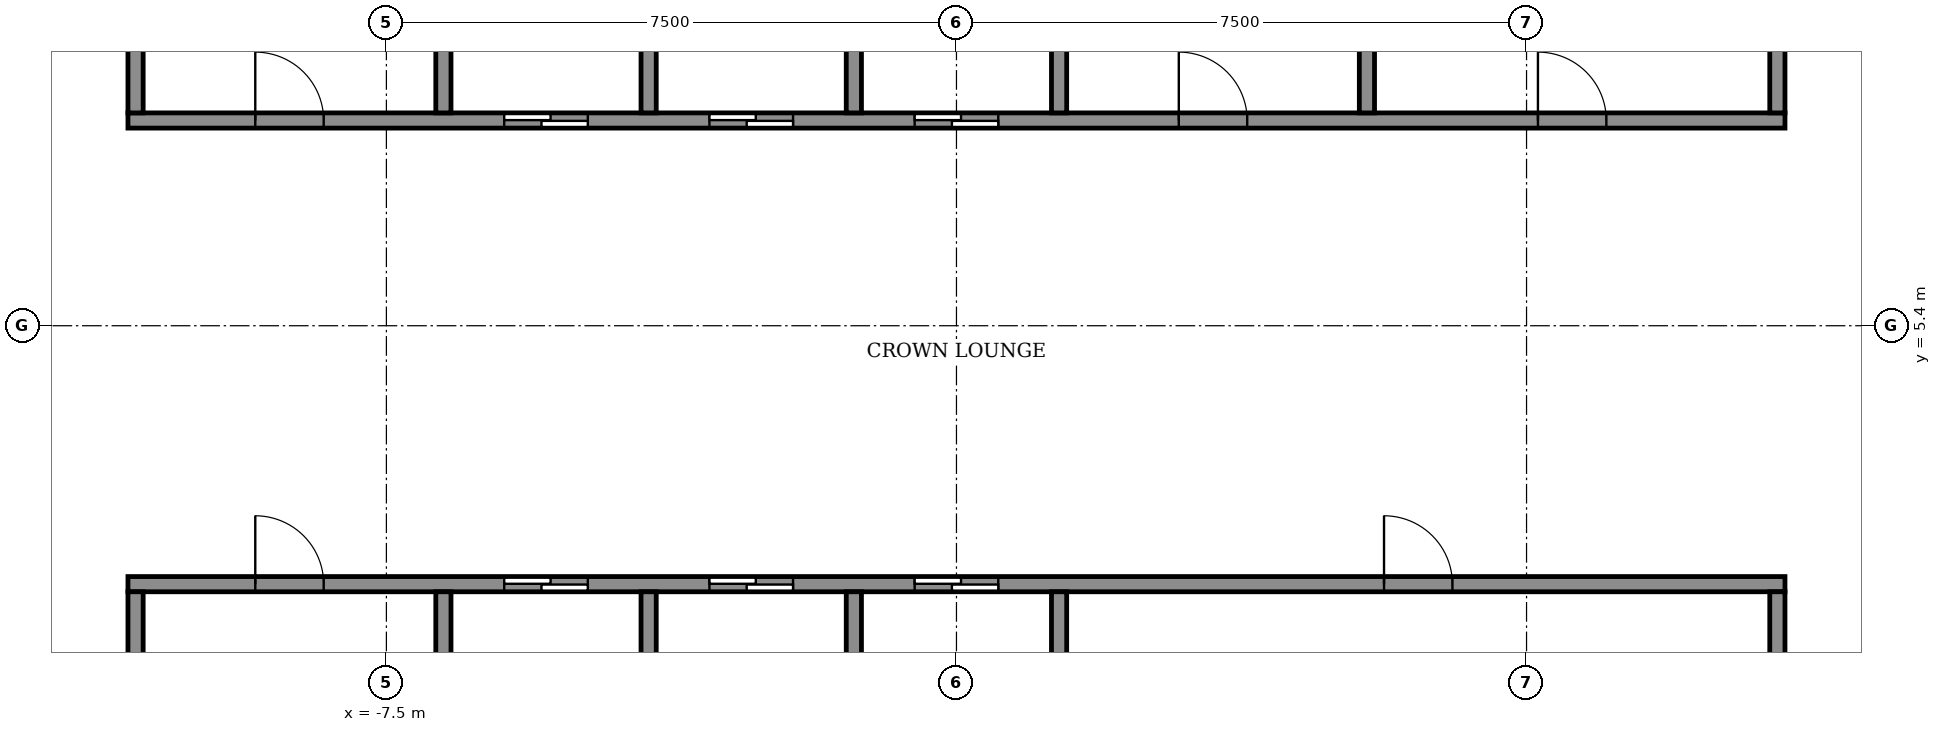
"""IFC4 building model, lengths in metres.
Left out: names, types, materials, properties, quantities, classifications, styles, units other than length and angle.
Written with IfcOpenShell. Run it as: python <this file> out.ifc"""

import sys

from ifc_helpers import new_model, si_unit, direction, frame, frame_2d, origin, place, context, subcontext, project, spatial, rectangle, extrude, element, fill, save


model = new_model("IFC4")
c1 = context("Model", 3, precision=1e-05, world=origin(), true_north=direction((0.0, 1.0)))
c2 = subcontext(c1, "Body", "Model", "MODEL_VIEW")
j1 = project(units=[si_unit("LENGTHUNIT", "METRE"), si_unit("PLANEANGLEUNIT", "RADIAN")], contexts=[c1])
p1 = place(None, origin())
s1 = spatial("IfcSite", under=j1, at=p1, CompositionType="ELEMENT")
p2 = place(p1, origin())
s2 = spatial("IfcBuilding", under=s1, at=p2, CompositionType="ELEMENT")
p3 = place(p2, frame((0.0, 0.0, 342.5)))
s3 = spatial("IfcBuildingStorey", under=s2, at=p3, CompositionType="ELEMENT", Elevation=342.5)
p4 = place(p3, frame((-10.9, 2.0, 0.0), z_axis=(0.0, 0.0, 1.0), x_axis=(1.0, 0.0, 0.0)))
e1 = element("IfcWall", 1, at=p4, inside=s3, PredefinedType="SHEAR", context=c2, shape_type="SweptSolid", body=[
    extrude(rectangle(XDim=21.8, YDim=0.2, at=frame_2d((10.9, 0.0))), origin(), (0.0, 0.0, 1.0), 3.05),
])
p5 = place(p4, frame((4.95, 0.0, 0.0)))
e2 = element("IfcOpeningElement", 2, at=p5, cuts=e1, PredefinedType="OPENING", context=c2, shape_type="SweptSolid", body=[
    extrude(rectangle(XDim=1.1, YDim=2.1, at=frame_2d((0.55, 1.05))), frame((0.0, 0.11, 0.0), z_axis=(0.0, -1.0, 0.0), x_axis=(1.0, 0.0, 0.0)), (0.0, 0.0, 1.0), 0.22),
])
p6 = place(p4, frame((7.65, 0.0, 0.0)))
e3 = element("IfcOpeningElement", 3, at=p6, cuts=e1, PredefinedType="OPENING", context=c2, shape_type="SweptSolid", body=[
    extrude(rectangle(XDim=1.1, YDim=2.1, at=frame_2d((0.55, 1.05))), frame((0.0, 0.11, 0.0), z_axis=(0.0, -1.0, 0.0), x_axis=(1.0, 0.0, 0.0)), (0.0, 0.0, 1.0), 0.22),
])
p7 = place(p4, frame((10.35, 0.0, 0.0)))
e4 = element("IfcOpeningElement", 4, at=p7, cuts=e1, PredefinedType="OPENING", context=c2, shape_type="SweptSolid", body=[
    extrude(rectangle(XDim=1.1, YDim=2.1, at=frame_2d((0.55, 1.05))), frame((0.0, 0.11, 0.0), z_axis=(0.0, -1.0, 0.0), x_axis=(1.0, 0.0, 0.0)), (0.0, 0.0, 1.0), 0.22),
])
p8 = place(p4, frame((1.675, 0.0, 0.0)))
e5 = element("IfcOpeningElement", 5, at=p8, cuts=e1, PredefinedType="OPENING", context=c2, shape_type="SweptSolid", body=[
    extrude(rectangle(XDim=0.9, YDim=2.1, at=frame_2d((0.45, 1.05))), frame((0.0, 0.11, 0.0), z_axis=(0.0, -1.0, 0.0), x_axis=(1.0, 0.0, 0.0)), (0.0, 0.0, 1.0), 0.22),
])
p9 = place(p4, frame((16.525, 0.0, 0.0)))
e6 = element("IfcOpeningElement", 6, at=p9, cuts=e1, PredefinedType="OPENING", context=c2, shape_type="SweptSolid", body=[
    extrude(rectangle(XDim=0.9, YDim=2.1, at=frame_2d((0.45, 1.05))), frame((0.0, 0.11, 0.0), z_axis=(0.0, -1.0, 0.0), x_axis=(1.0, 0.0, 0.0)), (0.0, 0.0, 1.0), 0.22),
])
p10 = place(p3, frame((-10.9, 8.1, 0.0), z_axis=(0.0, 0.0, 1.0), x_axis=(1.0, 0.0, 0.0)))
e7 = element("IfcWall", 7, at=p10, inside=s3, PredefinedType="SHEAR", context=c2, shape_type="SweptSolid", body=[
    extrude(rectangle(XDim=21.8, YDim=0.2, at=frame_2d((10.9, 0.0))), origin(), (0.0, 0.0, 1.0), 3.05),
])
p11 = place(p10, frame((4.95, 0.0, 0.0)))
e8 = element("IfcOpeningElement", 8, at=p11, cuts=e7, PredefinedType="OPENING", context=c2, shape_type="SweptSolid", body=[
    extrude(rectangle(XDim=1.1, YDim=2.1, at=frame_2d((0.55, 1.05))), frame((0.0, 0.11, 0.0), z_axis=(0.0, -1.0, 0.0), x_axis=(1.0, 0.0, 0.0)), (0.0, 0.0, 1.0), 0.22),
])
p12 = place(p10, frame((7.65, 0.0, 0.0)))
e9 = element("IfcOpeningElement", 9, at=p12, cuts=e7, PredefinedType="OPENING", context=c2, shape_type="SweptSolid", body=[
    extrude(rectangle(XDim=1.1, YDim=2.1, at=frame_2d((0.55, 1.05))), frame((0.0, 0.11, 0.0), z_axis=(0.0, -1.0, 0.0), x_axis=(1.0, 0.0, 0.0)), (0.0, 0.0, 1.0), 0.22),
])
p13 = place(p10, frame((10.35, 0.0, 0.0)))
e10 = element("IfcOpeningElement", 10, at=p13, cuts=e7, PredefinedType="OPENING", context=c2, shape_type="SweptSolid", body=[
    extrude(rectangle(XDim=1.1, YDim=2.1, at=frame_2d((0.55, 1.05))), frame((0.0, 0.11, 0.0), z_axis=(0.0, -1.0, 0.0), x_axis=(1.0, 0.0, 0.0)), (0.0, 0.0, 1.0), 0.22),
])
p14 = place(p10, frame((1.675, 0.0, 0.0)))
e11 = element("IfcOpeningElement", 11, at=p14, cuts=e7, PredefinedType="OPENING", context=c2, shape_type="SweptSolid", body=[
    extrude(rectangle(XDim=0.9, YDim=2.1, at=frame_2d((0.45, 1.05))), frame((0.0, 0.11, 0.0), z_axis=(0.0, -1.0, 0.0), x_axis=(1.0, 0.0, 0.0)), (0.0, 0.0, 1.0), 0.22),
])
p15 = place(p10, frame((13.825, 0.0, 0.0)))
e12 = element("IfcOpeningElement", 12, at=p15, cuts=e7, PredefinedType="OPENING", context=c2, shape_type="SweptSolid", body=[
    extrude(rectangle(XDim=0.9, YDim=2.1, at=frame_2d((0.45, 1.05))), frame((0.0, 0.11, 0.0), z_axis=(0.0, -1.0, 0.0), x_axis=(1.0, 0.0, 0.0)), (0.0, 0.0, 1.0), 0.22),
])
p16 = place(p10, frame((18.55, 0.0, 0.0)))
e13 = element("IfcOpeningElement", 13, at=p16, cuts=e7, PredefinedType="OPENING", context=c2, shape_type="SweptSolid", body=[
    extrude(rectangle(XDim=0.9, YDim=2.1, at=frame_2d((0.45, 1.05))), frame((0.0, 0.11, 0.0), z_axis=(0.0, -1.0, 0.0), x_axis=(1.0, 0.0, 0.0)), (0.0, 0.0, 1.0), 0.22),
])
p17 = place(p3, frame((-10.8, -0.6, 0.0), z_axis=(0.0, 0.0, 1.0), x_axis=(0.0, 1.0, 0.0)))
e14 = element("IfcWall", 14, at=p17, inside=s3, PredefinedType="STANDARD", context=c2, shape_type="SweptSolid", body=[
    extrude(rectangle(XDim=2.5, YDim=0.2, at=frame_2d((1.25, 0.0))), origin(), (0.0, 0.0, 1.0), 3.05),
])
for number, where, z_axis, x_axis in (
    (15, (-6.75, -0.6, 0.0), (0.0, 0.0, 1.0), (0.0, 1.0, 0.0)),
    (16, (-4.05, -0.6, 0.0), (0.0, 0.0, 1.0), (0.0, 1.0, 0.0)),
    (17, (-1.35, -0.6, 0.0), (0.0, 0.0, 1.0), (0.0, 1.0, 0.0)),
    (18, (1.35, -0.6, 0.0), (0.0, 0.0, 1.0), (0.0, 1.0, 0.0)),
):
    element("IfcWall", number, at=place(p3, frame(where, z_axis=z_axis, x_axis=x_axis)), inside=s3, PredefinedType="SHEAR", context=c2, shape_type="SweptSolid", body=[
        extrude(rectangle(XDim=2.5, YDim=0.2, at=frame_2d((1.25, 0.0))), origin(), (0.0, 0.0, 1.0), 3.05),
    ])
p18 = place(p3, frame((10.8, -0.6, 0.0), z_axis=(0.0, 0.0, 1.0), x_axis=(0.0, 1.0, 0.0)))
e19 = element("IfcWall", 19, at=p18, inside=s3, PredefinedType="STANDARD", context=c2, shape_type="SweptSolid", body=[
    extrude(rectangle(XDim=2.5, YDim=0.2, at=frame_2d((1.25, 0.0))), origin(), (0.0, 0.0, 1.0), 3.05),
])
p19 = place(p3, frame((-10.8, 8.2, 0.0), z_axis=(0.0, 0.0, 1.0), x_axis=(0.0, 1.0, 0.0)))
e20 = element("IfcWall", 20, at=p19, inside=s3, PredefinedType="STANDARD", context=c2, shape_type="SweptSolid", body=[
    extrude(rectangle(XDim=2.6, YDim=0.2, at=frame_2d((1.3, 0.0))), origin(), (0.0, 0.0, 1.0), 3.05),
])
for number, where, z_axis, x_axis in (
    (21, (-6.75, 8.2, 0.0), (0.0, 0.0, 1.0), (0.0, 1.0, 0.0)),
    (22, (-4.05, 8.2, 0.0), (0.0, 0.0, 1.0), (0.0, 1.0, 0.0)),
    (23, (-1.35, 8.2, 0.0), (0.0, 0.0, 1.0), (0.0, 1.0, 0.0)),
    (24, (1.35, 8.2, 0.0), (0.0, 0.0, 1.0), (0.0, 1.0, 0.0)),
):
    element("IfcWall", number, at=place(p3, frame(where, z_axis=z_axis, x_axis=x_axis)), inside=s3, PredefinedType="SHEAR", context=c2, shape_type="SweptSolid", body=[
        extrude(rectangle(XDim=2.6, YDim=0.2, at=frame_2d((1.3, 0.0))), origin(), (0.0, 0.0, 1.0), 3.05),
    ])
for number, where, z_axis, x_axis in (
    (25, (5.4, 8.2, 0.0), (0.0, 0.0, 1.0), (0.0, 1.0, 0.0)),
    (26, (10.8, 8.2, 0.0), (0.0, 0.0, 1.0), (0.0, 1.0, 0.0)),
):
    element("IfcWall", number, at=place(p3, frame(where, z_axis=z_axis, x_axis=x_axis)), inside=s3, PredefinedType="STANDARD", context=c2, shape_type="SweptSolid", body=[
        extrude(rectangle(XDim=2.6, YDim=0.2, at=frame_2d((1.3, 0.0))), origin(), (0.0, 0.0, 1.0), 3.05),
    ])
p20 = place(p5, origin())
e27 = element("IfcDoor", 27, at=p20, inside=s3, OperationType="SLIDING_TO_LEFT", PredefinedType="DOOR", context=c2, shape_type="SweptSolid", body=[
    extrude(rectangle(XDim=1.1, YDim=2.1, at=frame_2d((0.55, 1.05))), frame((0.0, 0.025, 0.0), z_axis=(0.0, -1.0, 0.0), x_axis=(1.0, 0.0, 0.0)), (0.0, 0.0, 1.0), 0.05),
])
fill(e2, e27)
p21 = place(p6, origin())
e28 = element("IfcDoor", 28, at=p21, inside=s3, OperationType="SLIDING_TO_LEFT", PredefinedType="DOOR", context=c2, shape_type="SweptSolid", body=[
    extrude(rectangle(XDim=1.1, YDim=2.1, at=frame_2d((0.55, 1.05))), frame((0.0, 0.025, 0.0), z_axis=(0.0, -1.0, 0.0), x_axis=(1.0, 0.0, 0.0)), (0.0, 0.0, 1.0), 0.05),
])
fill(e3, e28)
p22 = place(p7, origin())
e29 = element("IfcDoor", 29, at=p22, inside=s3, OperationType="SLIDING_TO_LEFT", PredefinedType="DOOR", context=c2, shape_type="SweptSolid", body=[
    extrude(rectangle(XDim=1.1, YDim=2.1, at=frame_2d((0.55, 1.05))), frame((0.0, 0.025, 0.0), z_axis=(0.0, -1.0, 0.0), x_axis=(1.0, 0.0, 0.0)), (0.0, 0.0, 1.0), 0.05),
])
fill(e4, e29)
p23 = place(p11, origin())
e30 = element("IfcDoor", 30, at=p23, inside=s3, OperationType="SLIDING_TO_LEFT", PredefinedType="DOOR", context=c2, shape_type="SweptSolid", body=[
    extrude(rectangle(XDim=1.1, YDim=2.1, at=frame_2d((0.55, 1.05))), frame((0.0, 0.025, 0.0), z_axis=(0.0, -1.0, 0.0), x_axis=(1.0, 0.0, 0.0)), (0.0, 0.0, 1.0), 0.05),
])
fill(e8, e30)
p24 = place(p12, origin())
e31 = element("IfcDoor", 31, at=p24, inside=s3, OperationType="SLIDING_TO_LEFT", PredefinedType="DOOR", context=c2, shape_type="SweptSolid", body=[
    extrude(rectangle(XDim=1.1, YDim=2.1, at=frame_2d((0.55, 1.05))), frame((0.0, 0.025, 0.0), z_axis=(0.0, -1.0, 0.0), x_axis=(1.0, 0.0, 0.0)), (0.0, 0.0, 1.0), 0.05),
])
fill(e9, e31)
p25 = place(p13, origin())
e32 = element("IfcDoor", 32, at=p25, inside=s3, OperationType="SLIDING_TO_LEFT", PredefinedType="DOOR", context=c2, shape_type="SweptSolid", body=[
    extrude(rectangle(XDim=1.1, YDim=2.1, at=frame_2d((0.55, 1.05))), frame((0.0, 0.025, 0.0), z_axis=(0.0, -1.0, 0.0), x_axis=(1.0, 0.0, 0.0)), (0.0, 0.0, 1.0), 0.05),
])
fill(e10, e32)
p26 = place(p8, origin())
e33 = element("IfcDoor", 33, at=p26, inside=s3, OperationType="SINGLE_SWING_LEFT", PredefinedType="DOOR", context=c2, shape_type="SweptSolid", body=[
    extrude(rectangle(XDim=0.9, YDim=2.1, at=frame_2d((0.45, 1.05))), frame((0.0, 0.025, 0.0), z_axis=(0.0, -1.0, 0.0), x_axis=(1.0, 0.0, 0.0)), (0.0, 0.0, 1.0), 0.05),
])
fill(e5, e33)
p27 = place(p9, origin())
e34 = element("IfcDoor", 34, at=p27, inside=s3, OperationType="SINGLE_SWING_RIGHT", PredefinedType="DOOR", context=c2, shape_type="SweptSolid", body=[
    extrude(rectangle(XDim=0.9, YDim=2.1, at=frame_2d((0.45, 1.05))), frame((0.0, 0.025, 0.0), z_axis=(0.0, -1.0, 0.0), x_axis=(1.0, 0.0, 0.0)), (0.0, 0.0, 1.0), 0.05),
])
fill(e6, e34)
p28 = place(p14, origin())
e35 = element("IfcDoor", 35, at=p28, inside=s3, OperationType="SINGLE_SWING_LEFT", PredefinedType="DOOR", context=c2, shape_type="SweptSolid", body=[
    extrude(rectangle(XDim=0.9, YDim=2.1, at=frame_2d((0.45, 1.05))), frame((0.0, 0.025, 0.0), z_axis=(0.0, -1.0, 0.0), x_axis=(1.0, 0.0, 0.0)), (0.0, 0.0, 1.0), 0.05),
])
fill(e11, e35)
p29 = place(p15, origin())
e36 = element("IfcDoor", 36, at=p29, inside=s3, OperationType="SINGLE_SWING_LEFT", PredefinedType="DOOR", context=c2, shape_type="SweptSolid", body=[
    extrude(rectangle(XDim=0.9, YDim=2.1, at=frame_2d((0.45, 1.05))), frame((0.0, 0.025, 0.0), z_axis=(0.0, -1.0, 0.0), x_axis=(1.0, 0.0, 0.0)), (0.0, 0.0, 1.0), 0.05),
])
fill(e12, e36)
p30 = place(p16, origin())
e37 = element("IfcDoor", 37, at=p30, inside=s3, OperationType="SINGLE_SWING_RIGHT", PredefinedType="DOOR", context=c2, shape_type="SweptSolid", body=[
    extrude(rectangle(XDim=0.9, YDim=2.1, at=frame_2d((0.45, 1.05))), frame((0.0, 0.025, 0.0), z_axis=(0.0, -1.0, 0.0), x_axis=(1.0, 0.0, 0.0)), (0.0, 0.0, 1.0), 0.05),
])
fill(e13, e37)
save(model, sys.argv[1])
